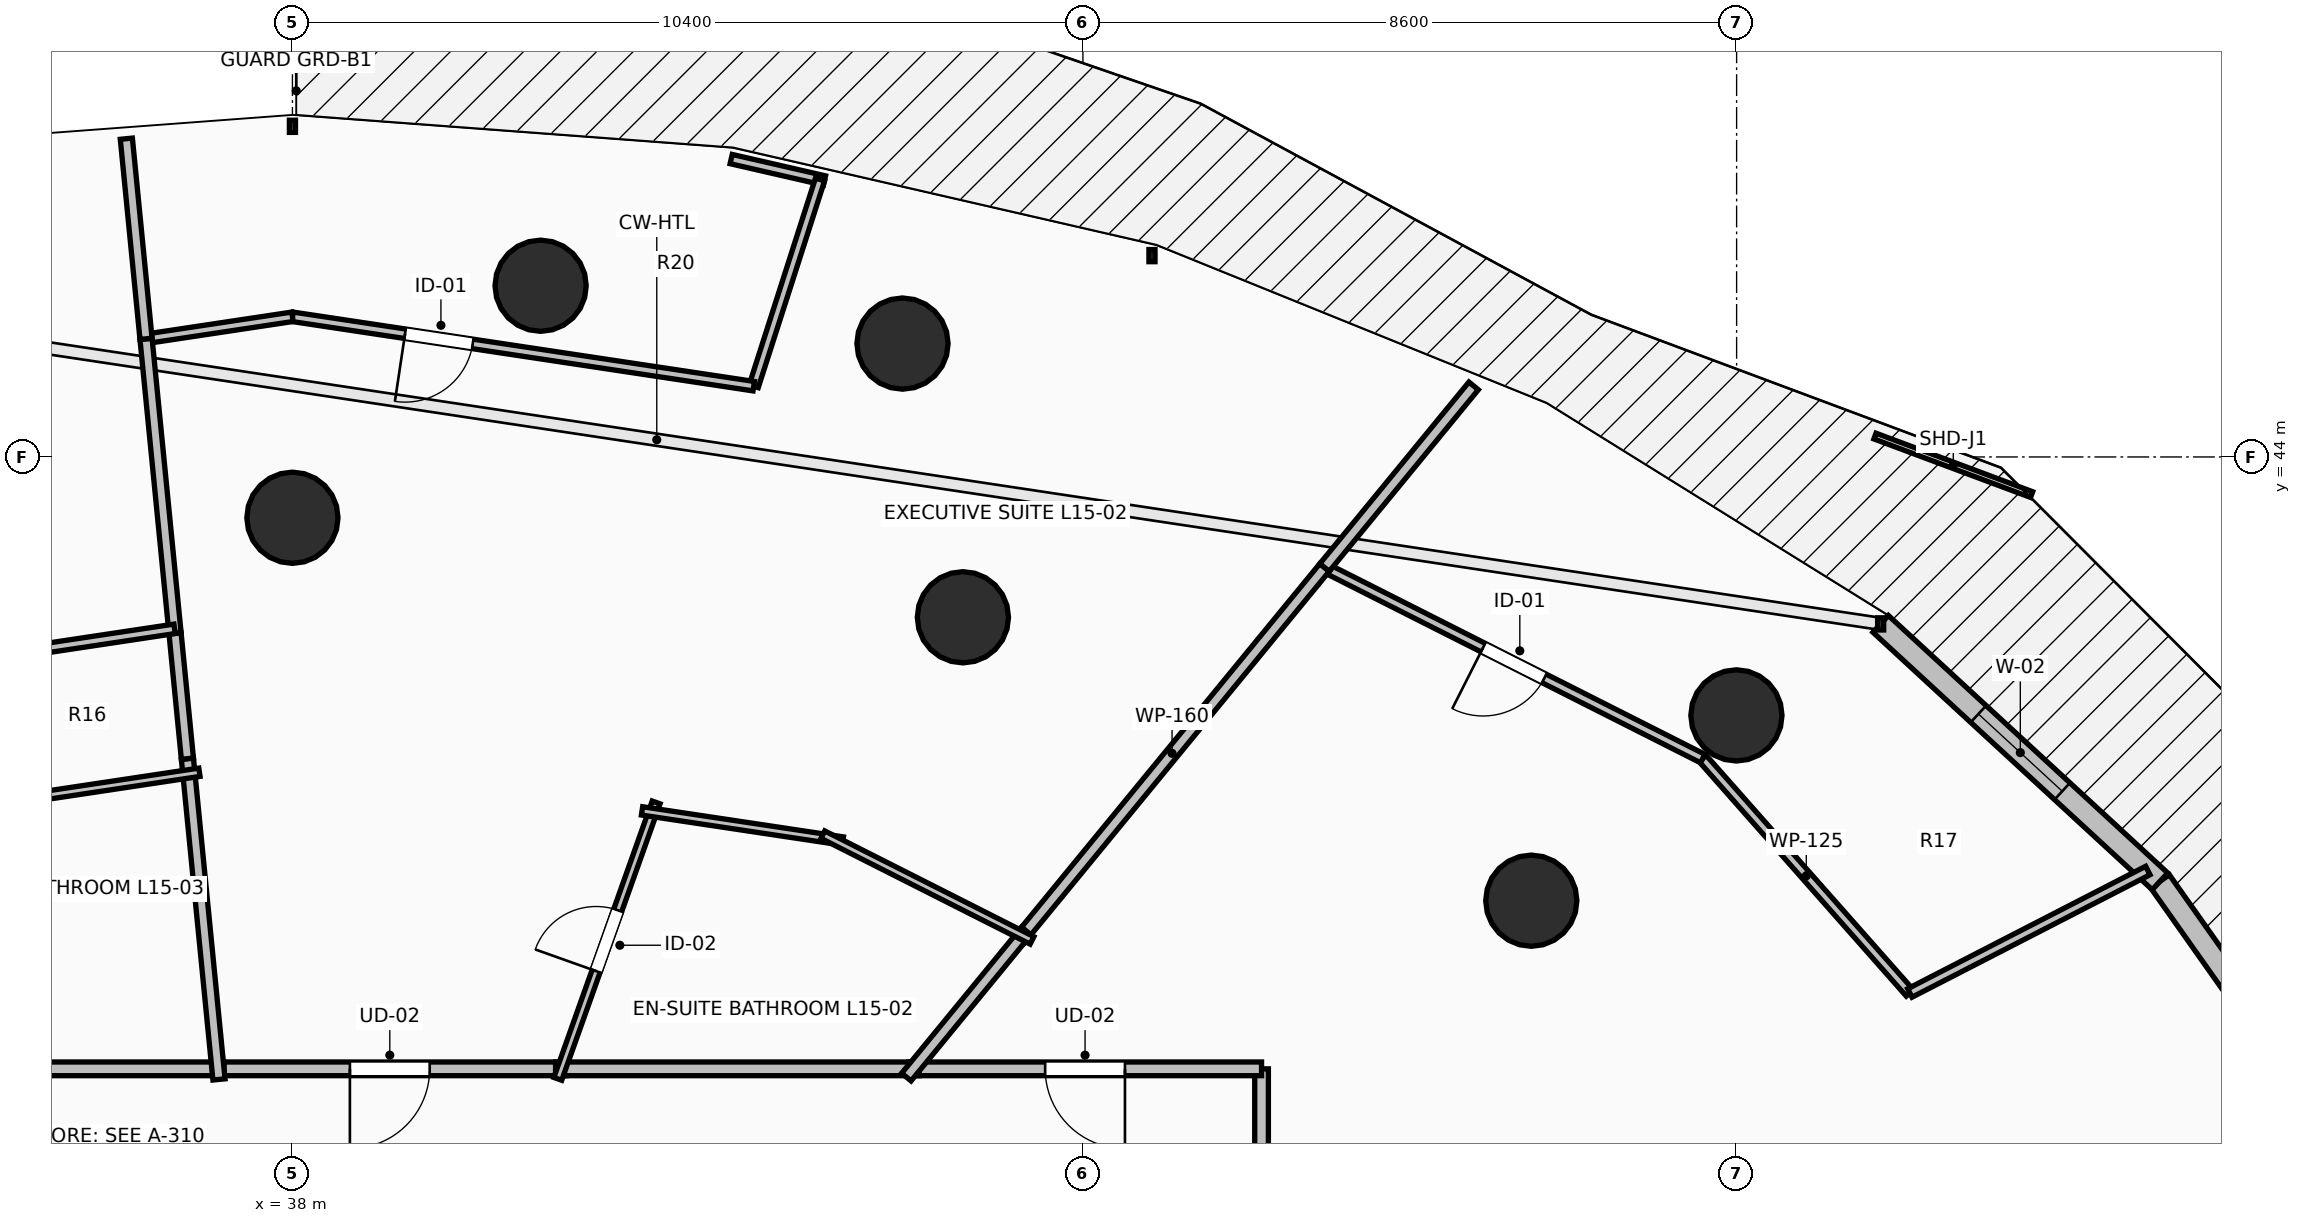
"""IFC4 building model, lengths in metres.
Left out: names, types, materials, properties, quantities, classifications, styles, units other than length and angle.
Written with IfcOpenShell. Run it as: python <this file> out.ifc"""

import sys

from ifc_helpers import new_model, si_unit, direction, frame, frame_2d, origin, origin_2d, place, context, subcontext, project, spatial, rectangle, circle, extrude, element, fill, save


model = new_model("IFC4")
c1 = context("Model", 3, precision=1e-05, world=origin(), true_north=direction((0.0, 1.0)))
c2 = subcontext(c1, "Body", "Model", "MODEL_VIEW")
j1 = project(units=[si_unit("LENGTHUNIT", "METRE"), si_unit("PLANEANGLEUNIT", "RADIAN")], contexts=[c1])
p1 = place(None, origin())
s1 = spatial("IfcSite", under=j1, at=p1, CompositionType="ELEMENT")
p2 = place(p1, origin())
s2 = spatial("IfcBuilding", under=s1, at=p2, CompositionType="ELEMENT")
p3 = place(p2, frame((0.0, 0.0, 59.0)))
s3 = spatial("IfcBuildingStorey", under=s2, at=p3, CompositionType="ELEMENT", Elevation=59.0)
for number, where, z_axis, x_axis in (
    (1, (54.299, 38.162, 0.0), (0.0, 0.0, 1.0), (0.707, 0.707, 0.0)),
    (2, (46.821, 41.891, 0.0), (0.0, 0.0, 1.0), (0.383, 0.924, 0.0)),
    (3, (38.0, 43.2, 0.0), (0.0, 0.0, 1.0), (0.0, 1.0, 0.0)),
    (4, (56.997, 40.6, 0.0), (0.0, 0.0, 1.0), (0.707, 0.707, 0.0)),
    (5, (46.026, 45.492, 0.0), (0.0, 0.0, 1.0), (0.383, 0.924, 0.0)),
    (6, (41.265, 46.252, 0.0), (0.0, 0.0, 1.0), (0.0, 1.0, 0.0)),
):
    element("IfcColumn", number, at=place(p3, frame(where, z_axis=z_axis, x_axis=x_axis)), inside=s3, PredefinedType="COLUMN", context=c2, shape_type="SweptSolid", body=[
        extrude(circle(Radius=0.6, at=origin_2d()), origin(), (0.0, 0.0, 1.0), 3.5),
    ])
p4 = place(p3, frame((65.301, 34.553, 0.0), z_axis=(0.0, 0.0, 1.0), x_axis=(-0.577130815624, 0.816651713803, 0.0)))
e7 = element("IfcWall", 7, at=p4, inside=s3, PredefinedType="STANDARD", context=c2, shape_type="SweptSolid", body=[
    extrude(rectangle(XDim=4.731, YDim=0.3, at=frame_2d((2.366, 0.0))), origin(), (0.0, 0.0, 1.0), 3.24),
])
p5 = place(p4, frame((1.566, 0.0, 0.0)))
e8 = element("IfcOpeningElement", 8, at=p5, cuts=e7, PredefinedType="OPENING", context=c2, shape_type="SweptSolid", body=[
    extrude(rectangle(XDim=1.6, YDim=2.3, at=frame_2d((0.8, 1.15))), frame((0.0, 0.165, 0.0), z_axis=(0.0, -1.0, 0.0), x_axis=(1.0, 0.0, 0.0)), (0.0, 0.0, 1.0), 0.33),
])
p6 = place(p3, frame((62.57, 38.417, 0.0), z_axis=(0.0, 0.0, 1.0), x_axis=(-0.735342629635, 0.677695519419, 0.0)))
e9 = element("IfcWall", 9, at=p6, inside=s3, PredefinedType="STANDARD", context=c2, shape_type="SweptSolid", body=[
    extrude(rectangle(XDim=4.997, YDim=0.3, at=frame_2d((2.499, 0.0))), origin(), (0.0, 0.0, 1.0), 3.24),
])
p7 = place(p6, frame((1.749, 0.0, 0.85)))
e10 = element("IfcOpeningElement", 10, at=p7, cuts=e9, PredefinedType="OPENING", context=c2, shape_type="SweptSolid", body=[
    extrude(rectangle(XDim=1.5, YDim=2.19, at=frame_2d((0.75, 1.095))), frame((0.0, 0.165, 0.0), z_axis=(0.0, -1.0, 0.0), x_axis=(1.0, 0.0, 0.0)), (0.0, 0.0, 1.0), 0.33),
])
p8 = place(p3, frame((50.75, 32.001, 0.0), z_axis=(0.0, 0.0, 1.0), x_axis=(0.0, 1.0, 0.0)))
e11 = element("IfcWall", 11, at=p8, inside=s3, PredefinedType="PARTITIONING", context=c2, shape_type="SweptSolid", body=[
    extrude(rectangle(XDim=3.949, YDim=0.18, at=frame_2d((1.975, 0.0))), origin(), (0.0, 0.0, 1.0), 2.432),
])
p9 = place(p3, frame((50.75, 35.95, 0.0), z_axis=(0.0, 0.0, 1.0), x_axis=(-1.0, 0.0, 0.0)))
e12 = element("IfcWall", 12, at=p9, inside=s3, PredefinedType="PARTITIONING", context=c2, shape_type="SweptSolid", body=[
    extrude(rectangle(XDim=4.644, YDim=0.18, at=frame_2d((2.322, 0.0))), origin(), (0.0, 0.0, 1.0), 2.432),
])
p10 = place(p9, frame((1.797, 0.0, 0.0)))
e13 = element("IfcOpeningElement", 13, at=p10, cuts=e12, PredefinedType="OPENING", context=c2, shape_type="SweptSolid", body=[
    extrude(rectangle(XDim=1.05, YDim=2.2, at=frame_2d((0.525, 1.1))), frame((0.0, 0.105, 0.0), z_axis=(0.0, -1.0, 0.0), x_axis=(1.0, 0.0, 0.0)), (0.0, 0.0, 1.0), 0.21),
])
p11 = place(p3, frame((41.602, 35.95, 0.0), z_axis=(0.0, 0.0, 1.0), x_axis=(-1.0, 0.0, 0.0)))
e14 = element("IfcWall", 14, at=p11, inside=s3, PredefinedType="PARTITIONING", context=c2, shape_type="SweptSolid", body=[
    extrude(rectangle(XDim=4.642, YDim=0.18, at=frame_2d((2.321, 0.0))), origin(), (0.0, 0.0, 1.0), 3.24),
])
p12 = place(p11, frame((1.796, 0.0, 0.0)))
e15 = element("IfcOpeningElement", 15, at=p12, cuts=e14, PredefinedType="OPENING", context=c2, shape_type="SweptSolid", body=[
    extrude(rectangle(XDim=1.05, YDim=2.2, at=frame_2d((0.525, 1.1))), frame((0.0, 0.105, 0.0), z_axis=(0.0, -1.0, 0.0), x_axis=(1.0, 0.0, 0.0)), (0.0, 0.0, 1.0), 0.21),
])
p13 = place(p3, frame((46.246, 35.95, 0.0), z_axis=(0.0, 0.0, 1.0), x_axis=(-1.0, 0.0, 0.0)))
e16 = element("IfcWall", 16, at=p13, inside=s3, PredefinedType="PARTITIONING", context=c2, shape_type="SweptSolid", body=[
    extrude(rectangle(XDim=4.784, YDim=0.18, at=frame_2d((2.392, 0.0))), origin(), (0.0, 0.0, 1.0), 3.24),
])
p14 = place(p3, frame((37.1, 35.95, 0.0), z_axis=(0.0, 0.0, 1.0), x_axis=(-1.0, 0.0, 0.0)))
e17 = element("IfcWall", 17, at=p14, inside=s3, PredefinedType="PARTITIONING", context=c2, shape_type="SweptSolid", body=[
    extrude(rectangle(XDim=3.91, YDim=0.18, at=frame_2d((1.955, 0.0))), origin(), (0.0, 0.0, 1.0), 3.24),
])
p15 = place(p3, frame((59.279, 36.948, 0.0), z_axis=(0.0, 0.0, 1.0), x_axis=(-0.662159063844, 0.749363312532, 0.0)))
e18 = element("IfcWall", 18, at=p15, inside=s3, PredefinedType="PARTITIONING", context=c2, shape_type="SweptSolid", body=[
    extrude(rectangle(XDim=4.115, YDim=0.125, at=frame_2d((2.058, 0.0))), origin(), (0.0, 0.0, 1.0), 2.432),
])
p16 = place(p3, frame((56.554, 40.032, 0.0), z_axis=(0.0, 0.0, 1.0), x_axis=(-0.892518178955, 0.451011419184, 0.0)))
e19 = element("IfcWall", 19, at=p16, inside=s3, PredefinedType="PARTITIONING", context=c2, shape_type="SweptSolid", body=[
    extrude(rectangle(XDim=5.574, YDim=0.125, at=frame_2d((2.787, 0.0))), origin(), (0.0, 0.0, 1.0), 2.432),
])
p17 = place(p16, frame((2.337, 0.0, 0.0)))
e20 = element("IfcOpeningElement", 20, at=p17, cuts=e19, PredefinedType="OPENING", context=c2, shape_type="SweptSolid", body=[
    extrude(rectangle(XDim=0.9, YDim=2.1, at=frame_2d((0.45, 1.05))), frame((0.0, 0.077, 0.0), z_axis=(0.0, -1.0, 0.0), x_axis=(1.0, 0.0, 0.0)), (0.0, 0.0, 1.0), 0.155),
])
p18 = place(p3, frame((62.41, 38.559, 0.0), z_axis=(0.0, 0.0, 1.0), x_axis=(-0.889180616302, -0.457556369852, 0.0)))
e21 = element("IfcWall", 21, at=p18, inside=s3, PredefinedType="PARTITIONING", context=c2, shape_type="SweptSolid", body=[
    extrude(rectangle(XDim=3.521, YDim=0.125, at=frame_2d((1.76, 0.0))), origin(), (0.0, 0.0, 1.0), 2.624),
])
p19 = place(p3, frame((51.579, 42.546, 0.0), z_axis=(0.0, 0.0, 1.0), x_axis=(-0.634407686013, -0.772998633846, 0.0)))
e22 = element("IfcWall", 22, at=p19, inside=s3, PredefinedType="PARTITIONING", context=c2, shape_type="SweptSolid", body=[
    extrude(rectangle(XDim=6.326, YDim=0.16, at=frame_2d((3.163, 0.0))), origin(), (0.0, 0.0, 1.0), 2.432),
])
p20 = place(p3, frame((47.655, 37.764, 0.0), z_axis=(0.0, 0.0, 1.0), x_axis=(-0.634343688691, -0.773051152653, 0.0)))
e23 = element("IfcWall", 23, at=p20, inside=s3, PredefinedType="PARTITIONING", context=c2, shape_type="SweptSolid", body=[
    extrude(rectangle(XDim=2.487, YDim=0.16, at=frame_2d((1.244, 0.0))), origin(), (0.0, 0.0, 1.0), 2.432),
])
p21 = place(p3, frame((53.54, 44.935, 0.0), z_axis=(0.0, 0.0, 1.0), x_axis=(-0.634432805544, -0.772978017313, 0.0)))
e24 = element("IfcWall", 24, at=p21, inside=s3, PredefinedType="PARTITIONING", context=c2, shape_type="SweptSolid", body=[
    extrude(rectangle(XDim=3.091, YDim=0.16, at=frame_2d((1.545, 0.0))), origin(), (0.0, 0.0, 1.0), 2.624),
])
p22 = place(p3, frame((41.491, 35.818, 0.0), z_axis=(0.0, 0.0, 1.0), x_axis=(0.33515815105, 0.942161883004, 0.0)))
e25 = element("IfcWall", 25, at=p22, inside=s3, PredefinedType="PARTITIONING", context=c2, shape_type="SweptSolid", body=[
    extrude(rectangle(XDim=3.86, YDim=0.11, at=frame_2d((1.93, 0.0))), origin(), (0.0, 0.0, 1.0), 2.929),
])
p23 = place(p22, frame((1.505, 0.0, 0.0)))
e26 = element("IfcOpeningElement", 26, at=p23, cuts=e25, PredefinedType="OPENING", context=c2, shape_type="SweptSolid", body=[
    extrude(rectangle(XDim=0.85, YDim=2.1, at=frame_2d((0.425, 1.05))), frame((0.0, 0.07, 0.0), z_axis=(0.0, -1.0, 0.0), x_axis=(1.0, 0.0, 0.0)), (0.0, 0.0, 1.0), 0.14),
])
p24 = place(p3, frame((42.6, 39.344, 0.0), z_axis=(0.0, 0.0, 1.0), x_axis=(0.988924954203, -0.148416424141, 0.0)))
e27 = element("IfcWall", 27, at=p24, inside=s3, PredefinedType="PARTITIONING", context=c2, shape_type="SweptSolid", body=[
    extrude(rectangle(XDim=2.671, YDim=0.11, at=frame_2d((1.336, 0.0))), origin(), (0.0, 0.0, 1.0), 3.24),
])
p25 = place(p3, frame((44.978, 39.031, 0.0), z_axis=(0.0, 0.0, 1.0), x_axis=(0.892423163915, -0.451199397725, 0.0)))
e28 = element("IfcWall", 28, at=p25, inside=s3, PredefinedType="PARTITIONING", context=c2, shape_type="SweptSolid", body=[
    extrude(rectangle(XDim=3.084, YDim=0.11, at=frame_2d((1.542, 0.0))), origin(), (0.0, 0.0, 1.0), 2.432),
])
p26 = place(p3, frame((45.0, 47.637, 0.0), z_axis=(0.0, 0.0, 1.0), x_axis=(-0.974635544723, 0.223798022695, 0.0)))
e29 = element("IfcWall", 29, at=p26, inside=s3, PredefinedType="PARTITIONING", context=c2, shape_type="SweptSolid", body=[
    extrude(rectangle(XDim=1.26, YDim=0.125, at=frame_2d((0.63, 0.0))), origin(), (0.0, 0.0, 1.0), 3.24),
])
p27 = place(p3, frame((44.941, 47.65, 0.0), z_axis=(0.0, 0.0, 1.0), x_axis=(-0.305331010086, -0.952246278165, 0.0)))
e30 = element("IfcWall", 30, at=p27, inside=s3, PredefinedType="PARTITIONING", context=c2, shape_type="SweptSolid", body=[
    extrude(rectangle(XDim=2.855, YDim=0.125, at=frame_2d((1.428, 0.0))), origin(), (0.0, 0.0, 1.0), 2.624),
])
p28 = place(p3, frame((44.069, 44.931, 0.0), z_axis=(0.0, 0.0, 1.0), x_axis=(-0.988871191019, 0.148774216759, 0.0)))
e31 = element("IfcWall", 31, at=p28, inside=s3, PredefinedType="PARTITIONING", context=c2, shape_type="SweptSolid", body=[
    extrude(rectangle(XDim=6.137, YDim=0.125, at=frame_2d((3.069, 0.0))), origin(), (0.0, 0.0, 1.0), 2.432),
])
p29 = place(p28, frame((3.739, 0.0, 0.0)))
e32 = element("IfcOpeningElement", 32, at=p29, cuts=e31, PredefinedType="OPENING", context=c2, shape_type="SweptSolid", body=[
    extrude(rectangle(XDim=0.9, YDim=2.1, at=frame_2d((0.45, 1.05))), frame((0.0, 0.077, 0.0), z_axis=(0.0, -1.0, 0.0), x_axis=(1.0, 0.0, 0.0)), (0.0, 0.0, 1.0), 0.155),
])
p30 = place(p3, frame((38.0, 45.844, 0.0), z_axis=(0.0, 0.0, 1.0), x_axis=(-0.988850683948, -0.148910459188, 0.0)))
e33 = element("IfcWall", 33, at=p30, inside=s3, PredefinedType="PARTITIONING", context=c2, shape_type="SweptSolid", body=[
    extrude(rectangle(XDim=1.948, YDim=0.125, at=frame_2d((0.974, 0.0))), origin(), (0.0, 0.0, 1.0), 2.624),
])
p31 = place(p3, frame((36.074, 45.554, 0.0), z_axis=(0.0, 0.0, 1.0), x_axis=(0.098125465648, -0.995174051607, 0.0)))
e34 = element("IfcWall", 34, at=p31, inside=s3, PredefinedType="PARTITIONING", context=c2, shape_type="SweptSolid", body=[
    extrude(rectangle(XDim=3.894, YDim=0.16, at=frame_2d((1.947, 0.0))), origin(), (0.0, 0.0, 1.0), 2.432),
])
p32 = place(p3, frame((36.618, 40.03, 0.0), z_axis=(0.0, 0.0, 1.0), x_axis=(0.09794716995, -0.995191615669, 0.0)))
e35 = element("IfcWall", 35, at=p32, inside=s3, PredefinedType="PARTITIONING", context=c2, shape_type="SweptSolid", body=[
    extrude(rectangle(XDim=4.24, YDim=0.16, at=frame_2d((2.12, 0.0))), origin(), (0.0, 0.0, 1.0), 2.929),
])
p33 = place(p3, frame((36.456, 41.679, 0.0), z_axis=(0.0, 0.0, 1.0), x_axis=(0.098146679276, -0.995171959687, 0.0)))
e36 = element("IfcWall", 36, at=p33, inside=s3, PredefinedType="PARTITIONING", context=c2, shape_type="SweptSolid", body=[
    extrude(rectangle(XDim=1.657, YDim=0.16, at=frame_2d((0.828, 0.0))), origin(), (0.0, 0.0, 1.0), 2.432),
])
p34 = place(p3, frame((35.815, 48.187, 0.0), z_axis=(0.0, 0.0, 1.0), x_axis=(0.097904750383, -0.995195789708, 0.0)))
e37 = element("IfcWall", 37, at=p34, inside=s3, PredefinedType="PARTITIONING", context=c2, shape_type="SweptSolid", body=[
    extrude(rectangle(XDim=2.646, YDim=0.16, at=frame_2d((1.323, 0.0))), origin(), (0.0, 0.0, 1.0), 2.624),
])
p35 = place(p3, frame((30.914, 40.906, 0.0), z_axis=(0.0, 0.0, 1.0), x_axis=(0.988867472121, 0.148798933401, 0.0)))
e38 = element("IfcWall", 38, at=p35, inside=s3, PredefinedType="PARTITIONING", context=c2, shape_type="SweptSolid", body=[
    extrude(rectangle(XDim=5.598, YDim=0.125, at=frame_2d((2.799, 0.0))), origin(), (0.0, 0.0, 1.0), 2.432),
])
p36 = place(p35, frame((2.349, 0.0, 0.0)))
e39 = element("IfcOpeningElement", 39, at=p36, cuts=e38, PredefinedType="OPENING", context=c2, shape_type="SweptSolid", body=[
    extrude(rectangle(XDim=0.9, YDim=2.1, at=frame_2d((0.45, 1.05))), frame((0.0, 0.077, 0.0), z_axis=(0.0, -1.0, 0.0), x_axis=(1.0, 0.0, 0.0)), (0.0, 0.0, 1.0), 0.155),
])
p37 = place(p3, frame((36.776, 39.852, 0.0), z_axis=(0.0, 0.0, 1.0), x_axis=(-0.988868403521, -0.148792743496, 0.0)))
e40 = element("IfcWall", 40, at=p37, inside=s3, PredefinedType="PARTITIONING", context=c2, shape_type="SweptSolid", body=[
    extrude(rectangle(XDim=5.2, YDim=0.11, at=frame_2d((2.6, 0.0))), origin(), (0.0, 0.0, 1.0), 2.432),
])
p38 = place(p7, origin())
e41 = element("IfcWindow", 41, at=p38, inside=s3, PartitioningType="SINGLE_PANEL", PredefinedType="WINDOW", context=c2, shape_type="SweptSolid", body=[
    extrude(rectangle(XDim=1.5, YDim=2.19, at=frame_2d((0.75, 1.095))), frame((0.0, 0.03, 0.0), z_axis=(0.0, -1.0, 0.0), x_axis=(1.0, 0.0, 0.0)), (0.0, 0.0, 1.0), 0.06),
])
fill(e10, e41)
p39 = place(p10, origin())
e42 = element("IfcDoor", 42, at=p39, inside=s3, OperationType="SINGLE_SWING_LEFT", PredefinedType="DOOR", context=c2, shape_type="SweptSolid", body=[
    extrude(rectangle(XDim=1.05, YDim=2.2, at=frame_2d((0.525, 1.1))), frame((0.0, 0.025, 0.0), z_axis=(0.0, -1.0, 0.0), x_axis=(1.0, 0.0, 0.0)), (0.0, 0.0, 1.0), 0.05),
])
fill(e13, e42)
p40 = place(p12, origin())
e43 = element("IfcDoor", 43, at=p40, inside=s3, OperationType="SINGLE_SWING_RIGHT", PredefinedType="DOOR", context=c2, shape_type="SweptSolid", body=[
    extrude(rectangle(XDim=1.05, YDim=2.2, at=frame_2d((0.525, 1.1))), frame((0.0, 0.025, 0.0), z_axis=(0.0, -1.0, 0.0), x_axis=(1.0, 0.0, 0.0)), (0.0, 0.0, 1.0), 0.05),
])
fill(e15, e43)
p41 = place(p17, origin())
e44 = element("IfcDoor", 44, at=p41, inside=s3, OperationType="SINGLE_SWING_RIGHT", PredefinedType="DOOR", context=c2, shape_type="SweptSolid", body=[
    extrude(rectangle(XDim=0.9, YDim=2.1, at=frame_2d((0.45, 1.05))), frame((0.0, 0.025, 0.0), z_axis=(0.0, -1.0, 0.0), x_axis=(1.0, 0.0, 0.0)), (0.0, 0.0, 1.0), 0.05),
])
fill(e20, e44)
p42 = place(p23, origin())
e45 = element("IfcDoor", 45, at=p42, inside=s3, OperationType="SINGLE_SWING_LEFT", PredefinedType="DOOR", context=c2, shape_type="SweptSolid", body=[
    extrude(rectangle(XDim=0.85, YDim=2.1, at=frame_2d((0.425, 1.05))), frame((0.0, 0.025, 0.0), z_axis=(0.0, -1.0, 0.0), x_axis=(1.0, 0.0, 0.0)), (0.0, 0.0, 1.0), 0.05),
])
fill(e26, e45)
p43 = place(p29, origin())
e46 = element("IfcDoor", 46, at=p43, inside=s3, OperationType="SINGLE_SWING_RIGHT", PredefinedType="DOOR", context=c2, shape_type="SweptSolid", body=[
    extrude(rectangle(XDim=0.9, YDim=2.1, at=frame_2d((0.45, 1.05))), frame((0.0, 0.025, 0.0), z_axis=(0.0, -1.0, 0.0), x_axis=(1.0, 0.0, 0.0)), (0.0, 0.0, 1.0), 0.05),
])
fill(e32, e46)
save(model, sys.argv[1])
